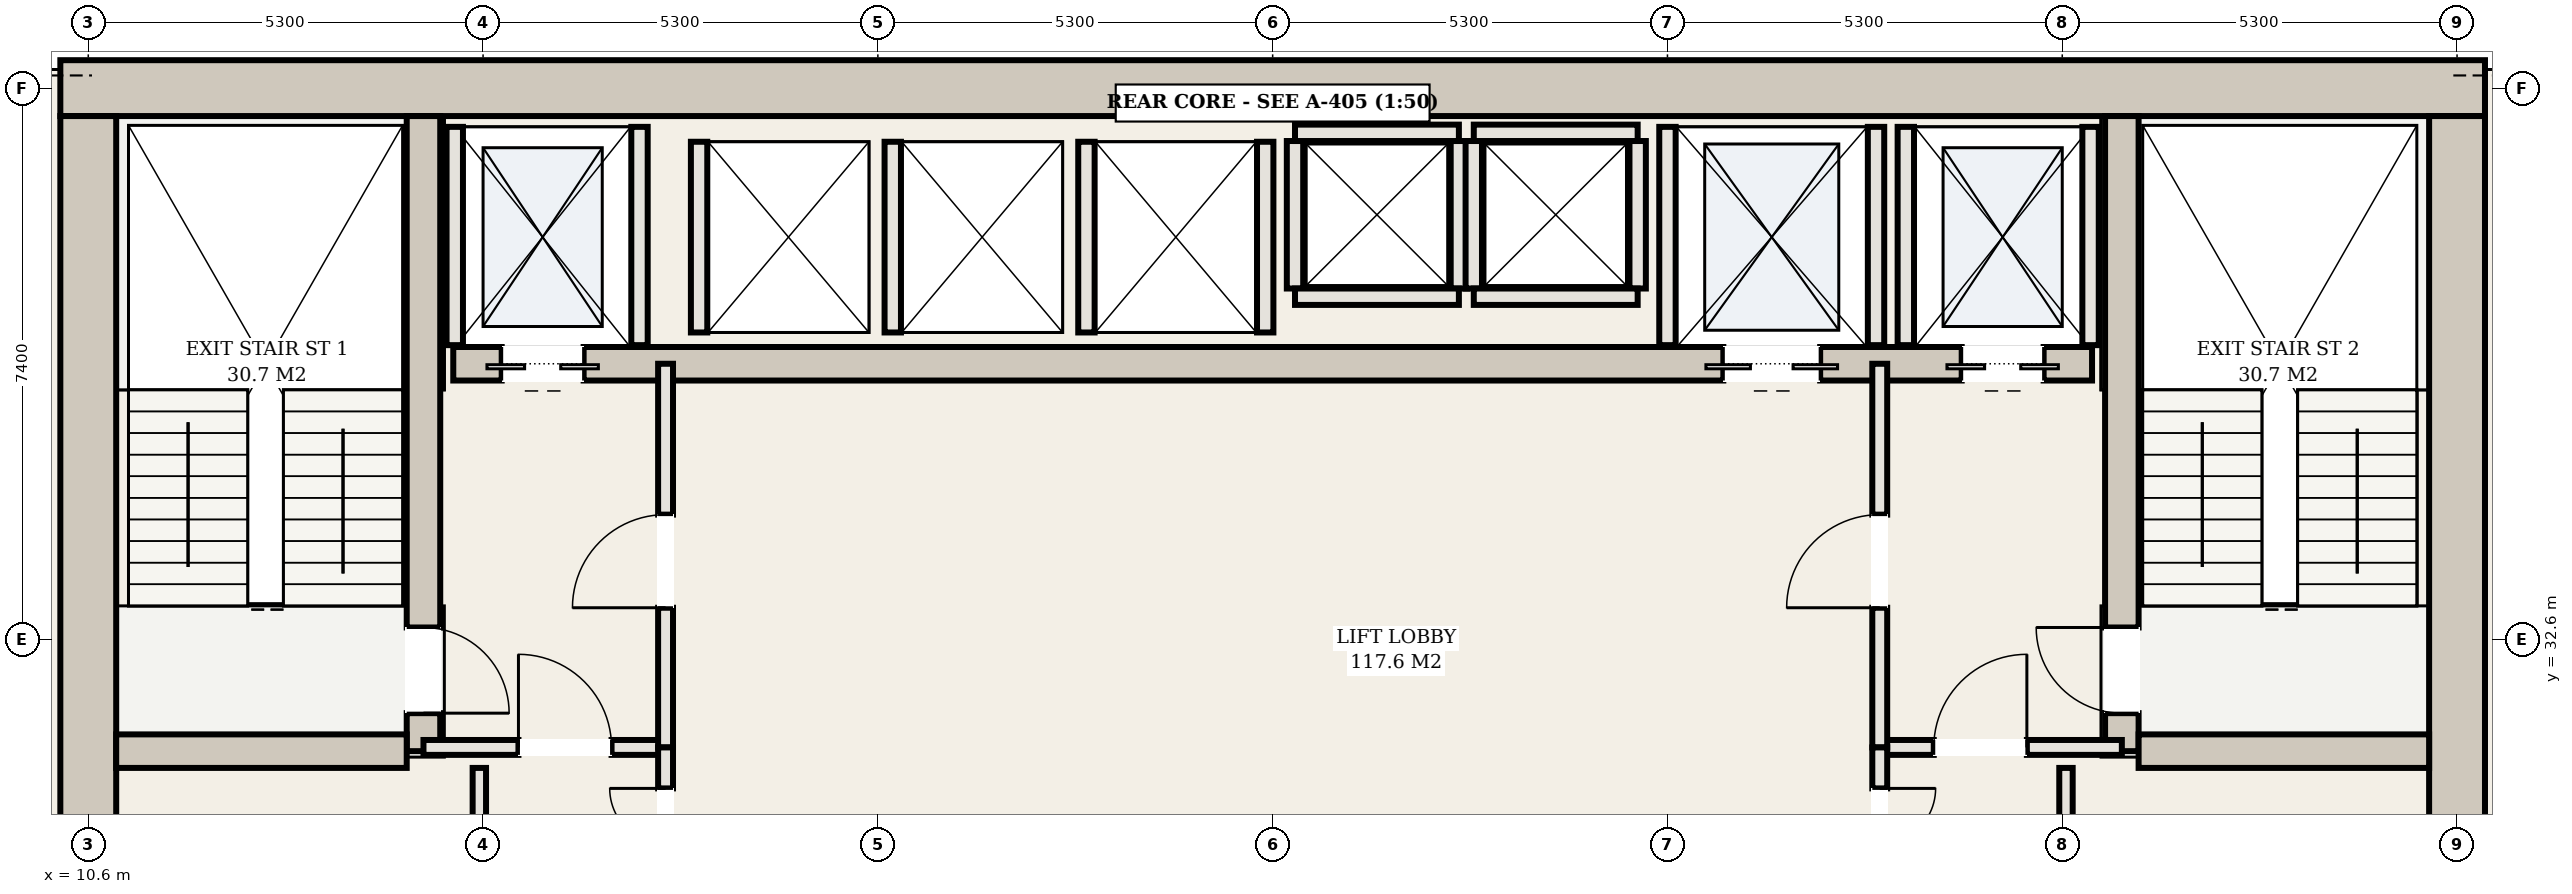
"""IFC4 building model, lengths in metres.
Left out: names, types, materials, properties, quantities, classifications, styles, units other than length and angle.
Written with IfcOpenShell. Run it as: python <this file> out.ifc"""

import sys

from ifc_helpers import new_model, si_unit, direction, frame, frame_2d, origin, place, context, subcontext, project, spatial, rectangle, extrude, element, fill, save


model = new_model("IFC4")
c1 = context("Model", 3, precision=1e-05, world=origin(), true_north=direction((0.0, 1.0)))
c2 = subcontext(c1, "Body", "Model", "MODEL_VIEW")
j1 = project(units=[si_unit("LENGTHUNIT", "METRE"), si_unit("PLANEANGLEUNIT", "RADIAN")], contexts=[c1])
p1 = place(None, origin())
s1 = spatial("IfcSite", under=j1, at=p1, CompositionType="ELEMENT")
p2 = place(p1, origin())
s2 = spatial("IfcBuilding", under=s1, at=p2, CompositionType="ELEMENT")
p3 = place(p2, frame((0.0, 0.0, 70.4)))
s3 = spatial("IfcBuildingStorey", under=s2, at=p3, CompositionType="ELEMENT", Elevation=70.4)
p4 = place(p3, frame((10.225, 40.0, 0.0), z_axis=(0.0, 0.0, 1.0), x_axis=(1.0, 0.0, 0.0)))
e1 = element("IfcWall", 1, at=p4, inside=s3, PredefinedType="SHEAR", context=c2, shape_type="SweptSolid", body=[
    extrude(rectangle(XDim=32.55, YDim=0.75, at=frame_2d((16.275, 0.0))), origin(), (0.0, 0.0, 1.0), 6.56),
])
for number, where, z_axis, x_axis in (
    (2, (10.6, 25.575, 0.0), (0.0, 0.0, 1.0), (0.0, 1.0, 0.0)),
    (3, (42.4, 25.575, 0.0), (0.0, 0.0, 1.0), (0.0, 1.0, 0.0)),
):
    element("IfcWall", number, at=place(p3, frame(where, z_axis=z_axis, x_axis=x_axis)), inside=s3, PredefinedType="SHEAR", context=c2, shape_type="SweptSolid", body=[
        extrude(rectangle(XDim=14.05, YDim=0.75, at=frame_2d((7.025, 0.0))), origin(), (0.0, 0.0, 1.0), 6.56),
    ])
p5 = place(p3, frame((15.1, 31.1, 0.0), z_axis=(0.0, 0.0, 1.0), x_axis=(0.0, 1.0, 0.0)))
e4 = element("IfcWall", 4, at=p5, inside=s3, PredefinedType="SHEAR", context=c2, shape_type="SweptSolid", body=[
    extrude(rectangle(XDim=8.525, YDim=0.45, at=frame_2d((4.262, 0.0))), origin(), (0.0, 0.0, 1.0), 6.56),
])
p6 = place(p5, frame((0.51, 0.0, 0.0)))
e5 = element("IfcOpeningElement", 5, at=p6, cuts=e4, PredefinedType="OPENING", context=c2, shape_type="SweptSolid", body=[
    extrude(rectangle(XDim=1.15, YDim=2.2, at=frame_2d((0.575, 1.1))), frame((0.0, 0.235, 0.0), z_axis=(0.0, -1.0, 0.0), x_axis=(1.0, 0.0, 0.0)), (0.0, 0.0, 1.0), 0.47),
])
p7 = place(p3, frame((10.975, 31.1, 0.0), z_axis=(0.0, 0.0, 1.0), x_axis=(1.0, 0.0, 0.0)))
e6 = element("IfcWall", 6, at=p7, inside=s3, PredefinedType="SHEAR", context=c2, shape_type="SweptSolid", body=[
    extrude(rectangle(XDim=3.9, YDim=0.45, at=frame_2d((1.95, 0.0))), origin(), (0.0, 0.0, 1.0), 6.56),
])
p8 = place(p3, frame((37.9, 31.1, 0.0), z_axis=(0.0, 0.0, 1.0), x_axis=(0.0, 1.0, 0.0)))
e7 = element("IfcWall", 7, at=p8, inside=s3, PredefinedType="SHEAR", context=c2, shape_type="SweptSolid", body=[
    extrude(rectangle(XDim=8.525, YDim=0.45, at=frame_2d((4.262, 0.0))), origin(), (0.0, 0.0, 1.0), 6.56),
])
p9 = place(p8, frame((0.51, 0.0, 0.0)))
e8 = element("IfcOpeningElement", 8, at=p9, cuts=e7, PredefinedType="OPENING", context=c2, shape_type="SweptSolid", body=[
    extrude(rectangle(XDim=1.15, YDim=2.2, at=frame_2d((0.575, 1.1))), frame((0.0, 0.235, 0.0), z_axis=(0.0, -1.0, 0.0), x_axis=(1.0, 0.0, 0.0)), (0.0, 0.0, 1.0), 0.47),
])
p10 = place(p3, frame((38.125, 31.1, 0.0), z_axis=(0.0, 0.0, 1.0), x_axis=(1.0, 0.0, 0.0)))
e9 = element("IfcWall", 9, at=p10, inside=s3, PredefinedType="SHEAR", context=c2, shape_type="SweptSolid", body=[
    extrude(rectangle(XDim=3.9, YDim=0.45, at=frame_2d((1.95, 0.0))), origin(), (0.0, 0.0, 1.0), 6.56),
])
p11 = place(p3, frame((15.5, 36.3, 0.0), z_axis=(0.0, 0.0, 1.0), x_axis=(1.0, 0.0, 0.0)))
e10 = element("IfcWall", 10, at=p11, inside=s3, PredefinedType="SHEAR", context=c2, shape_type="SweptSolid", body=[
    extrude(rectangle(XDim=22.0, YDim=0.45, at=frame_2d((11.0, 0.0))), origin(), (0.0, 0.0, 1.0), 6.56),
])
p12 = place(p11, frame((0.65, 0.0, 0.0)))
e11 = element("IfcOpeningElement", 11, at=p12, cuts=e10, PredefinedType="OPENING", context=c2, shape_type="SweptSolid", body=[
    extrude(rectangle(XDim=1.1, YDim=2.15, at=frame_2d((0.55, 1.075))), frame((0.0, 0.235, 0.0), z_axis=(0.0, -1.0, 0.0), x_axis=(1.0, 0.0, 0.0)), (0.0, 0.0, 1.0), 0.47),
])
p13 = place(p11, frame((20.25, 0.0, 0.0)))
e12 = element("IfcOpeningElement", 12, at=p13, cuts=e10, PredefinedType="OPENING", context=c2, shape_type="SweptSolid", body=[
    extrude(rectangle(XDim=1.1, YDim=2.15, at=frame_2d((0.55, 1.075))), frame((0.0, 0.235, 0.0), z_axis=(0.0, -1.0, 0.0), x_axis=(1.0, 0.0, 0.0)), (0.0, 0.0, 1.0), 0.47),
])
p14 = place(p11, frame((17.05, 0.0, 0.0)))
e13 = element("IfcOpeningElement", 13, at=p14, cuts=e10, PredefinedType="OPENING", context=c2, shape_type="SweptSolid", body=[
    extrude(rectangle(XDim=1.3, YDim=2.2, at=frame_2d((0.65, 1.1))), frame((0.0, 0.235, 0.0), z_axis=(0.0, -1.0, 0.0), x_axis=(1.0, 0.0, 0.0)), (0.0, 0.0, 1.0), 0.47),
])
for number, where, z_axis, x_axis in (
    (14, (15.52, 36.55, 0.0), (0.0, 0.0, 1.0), (0.0, 1.0, 0.0)),
    (15, (18.0, 36.55, 0.0), (0.0, 0.0, 1.0), (0.0, 1.0, 0.0)),
    (16, (35.0, 36.55, 0.0), (0.0, 0.0, 1.0), (0.0, 1.0, 0.0)),
    (17, (37.48, 36.55, 0.0), (0.0, 0.0, 1.0), (0.0, 1.0, 0.0)),
    (18, (31.8, 36.55, 0.0), (0.0, 0.0, 1.0), (0.0, 1.0, 0.0)),
    (19, (34.6, 36.55, 0.0), (0.0, 0.0, 1.0), (0.0, 1.0, 0.0)),
):
    element("IfcWall", number, at=place(p3, frame(where, z_axis=z_axis, x_axis=x_axis)), inside=s3, PredefinedType="SOLIDWALL", context=c2, shape_type="SweptSolid", body=[
        extrude(rectangle(XDim=2.93, YDim=0.22, at=frame_2d((1.465, 0.0))), origin(), (0.0, 0.0, 1.0), 6.56),
    ])
for number, where, z_axis, x_axis in (
    (20, (18.8, 36.72, 0.0), (0.0, 0.0, 1.0), (0.0, 1.0, 0.0)),
    (21, (21.4, 36.72, 0.0), (0.0, 0.0, 1.0), (0.0, 1.0, 0.0)),
    (22, (24.0, 36.72, 0.0), (0.0, 0.0, 1.0), (0.0, 1.0, 0.0)),
    (23, (26.4, 36.72, 0.0), (0.0, 0.0, 1.0), (0.0, 1.0, 0.0)),
):
    element("IfcWall", number, at=place(p3, frame(where, z_axis=z_axis, x_axis=x_axis)), inside=s3, PredefinedType="SOLIDWALL", context=c2, shape_type="SweptSolid", body=[
        extrude(rectangle(XDim=2.56, YDim=0.22, at=frame_2d((1.28, 0.0))), origin(), (0.0, 0.0, 1.0), 6.56),
    ])
for number, where, z_axis, x_axis in (
    (24, (26.8, 37.31, 0.0), (0.0, 0.0, 1.0), (0.0, 1.0, 0.0)),
    (25, (29.0, 37.31, 0.0), (0.0, 0.0, 1.0), (0.0, 1.0, 0.0)),
):
    element("IfcWall", number, at=place(p3, frame(where, z_axis=z_axis, x_axis=x_axis)), inside=s3, PredefinedType="SOLIDWALL", context=c2, shape_type="SweptSolid", body=[
        extrude(rectangle(XDim=1.98, YDim=0.22, at=frame_2d((0.99, 0.0))), origin(), (0.0, 0.0, 1.0), 6.56),
    ])
for number, where, z_axis, x_axis in (
    (26, (26.8, 39.4, 0.0), (0.0, 0.0, 1.0), (1.0, 0.0, 0.0)),
    (27, (26.8, 37.2, 0.0), (0.0, 0.0, 1.0), (1.0, 0.0, 0.0)),
):
    element("IfcWall", number, at=place(p3, frame(where, z_axis=z_axis, x_axis=x_axis)), inside=s3, PredefinedType="SOLIDWALL", context=c2, shape_type="SweptSolid", body=[
        extrude(rectangle(XDim=2.2, YDim=0.22, at=frame_2d((1.1, 0.0))), origin(), (0.0, 0.0, 1.0), 6.56),
    ])
for number, where, z_axis, x_axis in (
    (28, (29.2, 37.31, 0.0), (0.0, 0.0, 1.0), (0.0, 1.0, 0.0)),
    (29, (31.4, 37.31, 0.0), (0.0, 0.0, 1.0), (0.0, 1.0, 0.0)),
):
    element("IfcWall", number, at=place(p3, frame(where, z_axis=z_axis, x_axis=x_axis)), inside=s3, PredefinedType="SOLIDWALL", context=c2, shape_type="SweptSolid", body=[
        extrude(rectangle(XDim=1.98, YDim=0.22, at=frame_2d((0.99, 0.0))), origin(), (0.0, 0.0, 1.0), 6.56),
    ])
for number, where, z_axis, x_axis in (
    (30, (29.2, 39.4, 0.0), (0.0, 0.0, 1.0), (1.0, 0.0, 0.0)),
    (31, (29.2, 37.2, 0.0), (0.0, 0.0, 1.0), (1.0, 0.0, 0.0)),
):
    element("IfcWall", number, at=place(p3, frame(where, z_axis=z_axis, x_axis=x_axis)), inside=s3, PredefinedType="SOLIDWALL", context=c2, shape_type="SweptSolid", body=[
        extrude(rectangle(XDim=2.2, YDim=0.22, at=frame_2d((1.1, 0.0))), origin(), (0.0, 0.0, 1.0), 6.56),
    ])
p15 = place(p3, frame((15.1, 31.15, 0.0), z_axis=(0.0, 0.0, 1.0), x_axis=(1.0, 0.0, 0.0)))
e32 = element("IfcWall", 32, at=p15, inside=s3, PredefinedType="PARTITIONING", context=c2, shape_type="SweptSolid", body=[
    extrude(rectangle(XDim=3.25, YDim=0.2, at=frame_2d((1.625, 0.0))), origin(), (0.0, 0.0, 1.0), 6.56),
])
p16 = place(p15, frame((1.275, 0.0, 0.0)))
e33 = element("IfcOpeningElement", 33, at=p16, cuts=e32, PredefinedType="OPENING", context=c2, shape_type="SweptSolid", body=[
    extrude(rectangle(XDim=1.25, YDim=2.2, at=frame_2d((0.625, 1.1))), frame((0.0, 0.11, 0.0), z_axis=(0.0, -1.0, 0.0), x_axis=(1.0, 0.0, 0.0)), (0.0, 0.0, 1.0), 0.22),
])
p17 = place(p3, frame((18.35, 31.15, 0.0), z_axis=(0.0, 0.0, 1.0), x_axis=(0.0, 1.0, 0.0)))
e34 = element("IfcWall", 34, at=p17, inside=s3, PredefinedType="PARTITIONING", context=c2, shape_type="SweptSolid", body=[
    extrude(rectangle(XDim=5.15, YDim=0.2, at=frame_2d((2.575, 0.0))), origin(), (0.0, 0.0, 1.0), 6.56),
])
p18 = place(p17, frame((1.875, 0.0, 0.0)))
e35 = element("IfcOpeningElement", 35, at=p18, cuts=e34, PredefinedType="OPENING", context=c2, shape_type="SweptSolid", body=[
    extrude(rectangle(XDim=1.25, YDim=2.2, at=frame_2d((0.625, 1.1))), frame((0.0, 0.11, 0.0), z_axis=(0.0, -1.0, 0.0), x_axis=(1.0, 0.0, 0.0)), (0.0, 0.0, 1.0), 0.22),
])
p19 = place(p3, frame((34.65, 31.15, 0.0), z_axis=(0.0, 0.0, 1.0), x_axis=(1.0, 0.0, 0.0)))
e36 = element("IfcWall", 36, at=p19, inside=s3, PredefinedType="PARTITIONING", context=c2, shape_type="SweptSolid", body=[
    extrude(rectangle(XDim=3.25, YDim=0.2, at=frame_2d((1.625, 0.0))), origin(), (0.0, 0.0, 1.0), 6.56),
])
p20 = place(p19, frame((0.725, 0.0, 0.0)))
e37 = element("IfcOpeningElement", 37, at=p20, cuts=e36, PredefinedType="OPENING", context=c2, shape_type="SweptSolid", body=[
    extrude(rectangle(XDim=1.25, YDim=2.2, at=frame_2d((0.625, 1.1))), frame((0.0, 0.11, 0.0), z_axis=(0.0, -1.0, 0.0), x_axis=(1.0, 0.0, 0.0)), (0.0, 0.0, 1.0), 0.22),
])
p21 = place(p3, frame((34.65, 31.15, 0.0), z_axis=(0.0, 0.0, 1.0), x_axis=(0.0, 1.0, 0.0)))
e38 = element("IfcWall", 38, at=p21, inside=s3, PredefinedType="PARTITIONING", context=c2, shape_type="SweptSolid", body=[
    extrude(rectangle(XDim=5.15, YDim=0.2, at=frame_2d((2.575, 0.0))), origin(), (0.0, 0.0, 1.0), 6.56),
])
p22 = place(p21, frame((1.875, 0.0, 0.0)))
e39 = element("IfcOpeningElement", 39, at=p22, cuts=e38, PredefinedType="OPENING", context=c2, shape_type="SweptSolid", body=[
    extrude(rectangle(XDim=1.25, YDim=2.2, at=frame_2d((0.625, 1.1))), frame((0.0, 0.11, 0.0), z_axis=(0.0, -1.0, 0.0), x_axis=(1.0, 0.0, 0.0)), (0.0, 0.0, 1.0), 0.22),
])
p23 = place(p3, frame((15.85, 25.575, 0.0), z_axis=(0.0, 0.0, 1.0), x_axis=(0.0, 1.0, 0.0)))
e40 = element("IfcWall", 40, at=p23, inside=s3, PredefinedType="PARTITIONING", context=c2, shape_type="SweptSolid", body=[
    extrude(rectangle(XDim=5.3, YDim=0.18, at=frame_2d((2.65, 0.0))), origin(), (0.0, 0.0, 1.0), 5.055),
])
p24 = place(p23, frame((2.19, 0.0, 0.0)))
e41 = element("IfcOpeningElement", 41, at=p24, cuts=e40, PredefinedType="OPENING", context=c2, shape_type="SweptSolid", body=[
    extrude(rectangle(XDim=0.92, YDim=2.15, at=frame_2d((0.46, 1.075))), frame((0.0, 0.1, 0.0), z_axis=(0.0, -1.0, 0.0), x_axis=(1.0, 0.0, 0.0)), (0.0, 0.0, 1.0), 0.2),
])
p25 = place(p3, frame((37.15, 25.575, 0.0), z_axis=(0.0, 0.0, 1.0), x_axis=(0.0, 1.0, 0.0)))
e42 = element("IfcWall", 42, at=p25, inside=s3, PredefinedType="PARTITIONING", context=c2, shape_type="SweptSolid", body=[
    extrude(rectangle(XDim=5.3, YDim=0.18, at=frame_2d((2.65, 0.0))), origin(), (0.0, 0.0, 1.0), 5.055),
])
p26 = place(p25, frame((2.19, 0.0, 0.0)))
e43 = element("IfcOpeningElement", 43, at=p26, cuts=e42, PredefinedType="OPENING", context=c2, shape_type="SweptSolid", body=[
    extrude(rectangle(XDim=0.92, YDim=2.15, at=frame_2d((0.46, 1.075))), frame((0.0, 0.1, 0.0), z_axis=(0.0, -1.0, 0.0), x_axis=(1.0, 0.0, 0.0)), (0.0, 0.0, 1.0), 0.2),
])
p27 = place(p3, frame((18.35, 28.55, 0.0), z_axis=(0.0, 0.0, 1.0), x_axis=(0.0, 1.0, 0.0)))
e44 = element("IfcWall", 44, at=p27, inside=s3, PredefinedType="PARTITIONING", context=c2, shape_type="SweptSolid", body=[
    extrude(rectangle(XDim=2.6, YDim=0.2, at=frame_2d((1.3, 0.0))), origin(), (0.0, 0.0, 1.0), 6.56),
])
p28 = place(p27, frame((0.55, 0.0, 0.0)))
e45 = element("IfcOpeningElement", 45, at=p28, cuts=e44, PredefinedType="OPENING", context=c2, shape_type="SweptSolid", body=[
    extrude(rectangle(XDim=1.5, YDim=2.25, at=frame_2d((0.75, 1.125))), frame((0.0, 0.11, 0.0), z_axis=(0.0, -1.0, 0.0), x_axis=(1.0, 0.0, 0.0)), (0.0, 0.0, 1.0), 0.22),
])
p29 = place(p3, frame((34.65, 28.55, 0.0), z_axis=(0.0, 0.0, 1.0), x_axis=(0.0, 1.0, 0.0)))
e46 = element("IfcWall", 46, at=p29, inside=s3, PredefinedType="PARTITIONING", context=c2, shape_type="SweptSolid", body=[
    extrude(rectangle(XDim=2.6, YDim=0.2, at=frame_2d((1.3, 0.0))), origin(), (0.0, 0.0, 1.0), 6.56),
])
p30 = place(p29, frame((0.55, 0.0, 0.0)))
e47 = element("IfcOpeningElement", 47, at=p30, cuts=e46, PredefinedType="OPENING", context=c2, shape_type="SweptSolid", body=[
    extrude(rectangle(XDim=1.5, YDim=2.25, at=frame_2d((0.75, 1.125))), frame((0.0, 0.11, 0.0), z_axis=(0.0, -1.0, 0.0), x_axis=(1.0, 0.0, 0.0)), (0.0, 0.0, 1.0), 0.22),
])
p31 = place(p12, frame((1.1, 0.0, 0.0), z_axis=(0.0, 0.0, 1.0), x_axis=(-1.0, 0.0, 0.0)))
e48 = element("IfcDoor", 48, at=p31, inside=s3, OperationType="DOUBLE_DOOR_SLIDING", PredefinedType="DOOR", context=c2, shape_type="SweptSolid", body=[
    extrude(rectangle(XDim=1.1, YDim=2.15, at=frame_2d((0.55, 1.075))), frame((0.0, 0.025, 0.0), z_axis=(0.0, -1.0, 0.0), x_axis=(1.0, 0.0, 0.0)), (0.0, 0.0, 1.0), 0.05),
])
fill(e11, e48)
p32 = place(p13, frame((1.1, 0.0, 0.0), z_axis=(0.0, 0.0, 1.0), x_axis=(-1.0, 0.0, 0.0)))
e49 = element("IfcDoor", 49, at=p32, inside=s3, OperationType="DOUBLE_DOOR_SLIDING", PredefinedType="DOOR", context=c2, shape_type="SweptSolid", body=[
    extrude(rectangle(XDim=1.1, YDim=2.15, at=frame_2d((0.55, 1.075))), frame((0.0, 0.025, 0.0), z_axis=(0.0, -1.0, 0.0), x_axis=(1.0, 0.0, 0.0)), (0.0, 0.0, 1.0), 0.05),
])
fill(e12, e49)
p33 = place(p14, frame((1.3, 0.0, 0.0), z_axis=(0.0, 0.0, 1.0), x_axis=(-1.0, 0.0, 0.0)))
e50 = element("IfcDoor", 50, at=p33, inside=s3, OperationType="DOUBLE_DOOR_SLIDING", PredefinedType="DOOR", context=c2, shape_type="SweptSolid", body=[
    extrude(rectangle(XDim=1.3, YDim=2.2, at=frame_2d((0.65, 1.1))), frame((0.0, 0.025, 0.0), z_axis=(0.0, -1.0, 0.0), x_axis=(1.0, 0.0, 0.0)), (0.0, 0.0, 1.0), 0.05),
])
fill(e13, e50)
p34 = place(p16, origin())
e51 = element("IfcDoor", 51, at=p34, inside=s3, OperationType="SINGLE_SWING_LEFT", PredefinedType="DOOR", context=c2, shape_type="SweptSolid", body=[
    extrude(rectangle(XDim=1.25, YDim=2.2, at=frame_2d((0.625, 1.1))), frame((0.0, 0.025, 0.0), z_axis=(0.0, -1.0, 0.0), x_axis=(1.0, 0.0, 0.0)), (0.0, 0.0, 1.0), 0.05),
])
fill(e33, e51)
p35 = place(p18, origin())
e52 = element("IfcDoor", 52, at=p35, inside=s3, OperationType="SINGLE_SWING_LEFT", PredefinedType="DOOR", context=c2, shape_type="SweptSolid", body=[
    extrude(rectangle(XDim=1.25, YDim=2.2, at=frame_2d((0.625, 1.1))), frame((0.0, 0.025, 0.0), z_axis=(0.0, -1.0, 0.0), x_axis=(1.0, 0.0, 0.0)), (0.0, 0.0, 1.0), 0.05),
])
fill(e35, e52)
p36 = place(p20, origin())
e53 = element("IfcDoor", 53, at=p36, inside=s3, OperationType="SINGLE_SWING_RIGHT", PredefinedType="DOOR", context=c2, shape_type="SweptSolid", body=[
    extrude(rectangle(XDim=1.25, YDim=2.2, at=frame_2d((0.625, 1.1))), frame((0.0, 0.025, 0.0), z_axis=(0.0, -1.0, 0.0), x_axis=(1.0, 0.0, 0.0)), (0.0, 0.0, 1.0), 0.05),
])
fill(e37, e53)
p37 = place(p22, origin())
e54 = element("IfcDoor", 54, at=p37, inside=s3, OperationType="SINGLE_SWING_LEFT", PredefinedType="DOOR", context=c2, shape_type="SweptSolid", body=[
    extrude(rectangle(XDim=1.25, YDim=2.2, at=frame_2d((0.625, 1.1))), frame((0.0, 0.025, 0.0), z_axis=(0.0, -1.0, 0.0), x_axis=(1.0, 0.0, 0.0)), (0.0, 0.0, 1.0), 0.05),
])
fill(e39, e54)
p38 = place(p6, frame((1.15, 0.0, 0.0), z_axis=(0.0, 0.0, 1.0), x_axis=(-1.0, 0.0, 0.0)))
e55 = element("IfcDoor", 55, at=p38, inside=s3, OperationType="SINGLE_SWING_RIGHT", PredefinedType="DOOR", context=c2, shape_type="SweptSolid", body=[
    extrude(rectangle(XDim=1.15, YDim=2.2, at=frame_2d((0.575, 1.1))), frame((0.0, 0.025, 0.0), z_axis=(0.0, -1.0, 0.0), x_axis=(1.0, 0.0, 0.0)), (0.0, 0.0, 1.0), 0.05),
])
fill(e5, e55)
p39 = place(p9, origin())
e56 = element("IfcDoor", 56, at=p39, inside=s3, OperationType="SINGLE_SWING_RIGHT", PredefinedType="DOOR", context=c2, shape_type="SweptSolid", body=[
    extrude(rectangle(XDim=1.15, YDim=2.2, at=frame_2d((0.575, 1.1))), frame((0.0, 0.025, 0.0), z_axis=(0.0, -1.0, 0.0), x_axis=(1.0, 0.0, 0.0)), (0.0, 0.0, 1.0), 0.05),
])
fill(e8, e56)
p40 = place(p28, origin())
e57 = element("IfcDoor", 57, at=p40, inside=s3, OperationType="DOUBLE_DOOR_SINGLE_SWING", PredefinedType="DOOR", context=c2, shape_type="SweptSolid", body=[
    extrude(rectangle(XDim=1.5, YDim=2.25, at=frame_2d((0.75, 1.125))), frame((0.0, 0.025, 0.0), z_axis=(0.0, -1.0, 0.0), x_axis=(1.0, 0.0, 0.0)), (0.0, 0.0, 1.0), 0.05),
])
fill(e45, e57)
p41 = place(p30, frame((1.5, 0.0, 0.0), z_axis=(0.0, 0.0, 1.0), x_axis=(-1.0, 0.0, 0.0)))
e58 = element("IfcDoor", 58, at=p41, inside=s3, OperationType="DOUBLE_DOOR_SINGLE_SWING", PredefinedType="DOOR", context=c2, shape_type="SweptSolid", body=[
    extrude(rectangle(XDim=1.5, YDim=2.25, at=frame_2d((0.75, 1.125))), frame((0.0, 0.025, 0.0), z_axis=(0.0, -1.0, 0.0), x_axis=(1.0, 0.0, 0.0)), (0.0, 0.0, 1.0), 0.05),
])
fill(e47, e58)
save(model, sys.argv[1])
